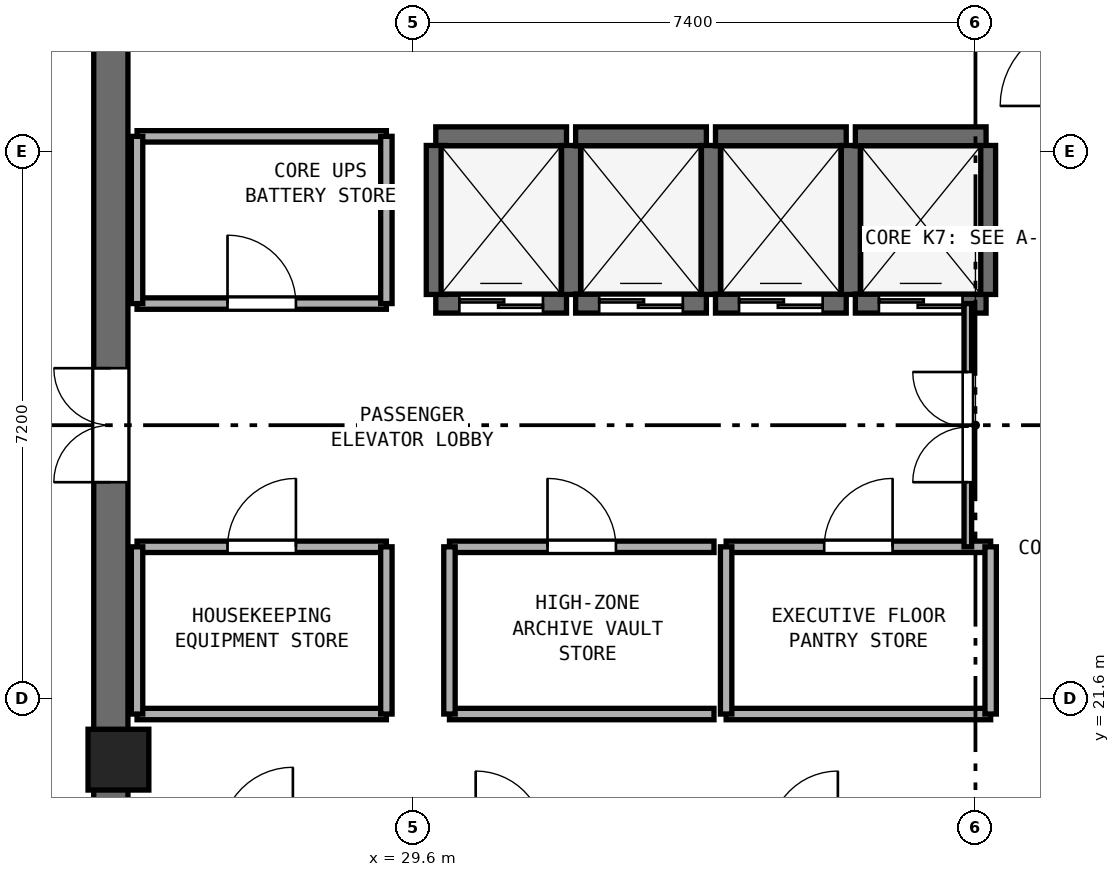
"""IFC4 building model, lengths in metres.
Left out: names, types, materials, properties, quantities, classifications, styles, units other than length and angle.
Written with IfcOpenShell. Run it as: python <this file> out.ifc"""

import sys

from ifc_helpers import new_model, si_unit, direction, frame, frame_2d, origin, origin_2d, place, context, subcontext, project, spatial, rectangle, extrude, element, fill, save


model = new_model("IFC4")
c1 = context("Model", 3, precision=1e-05, world=origin(), true_north=direction((0.0, 1.0)))
c2 = subcontext(c1, "Body", "Model", "MODEL_VIEW")
j1 = project(units=[si_unit("LENGTHUNIT", "METRE"), si_unit("PLANEANGLEUNIT", "RADIAN")], contexts=[c1])
p1 = place(None, origin())
s1 = spatial("IfcSite", under=j1, at=p1, CompositionType="ELEMENT")
p2 = place(p1, origin())
s2 = spatial("IfcBuilding", under=s1, at=p2, CompositionType="ELEMENT")
p3 = place(p2, frame((0.0, 0.0, 289.6)))
s3 = spatial("IfcBuildingStorey", under=s2, at=p3, CompositionType="ELEMENT", Elevation=289.6)
p4 = place(p3, frame((25.625, 17.45, 0.0), z_axis=(0.0, 0.0, 1.0), x_axis=(0.0, 1.0, 0.0)))
e1 = element("IfcWall", 1, at=p4, inside=s3, PredefinedType="SHEAR", context=c2, shape_type="SweptSolid", body=[
    extrude(rectangle(XDim=15.5, YDim=0.45, at=frame_2d((7.75, 0.0))), origin(), (0.0, 0.0, 1.0), 3.54),
])
p5 = place(p4, frame((7.0, 0.0, 0.0)))
e2 = element("IfcOpeningElement", 2, at=p5, cuts=e1, PredefinedType="OPENING", context=c2, shape_type="SweptSolid", body=[
    extrude(rectangle(XDim=1.5, YDim=2.15, at=frame_2d((0.75, 1.075))), frame((0.0, 0.235, 0.0), z_axis=(0.0, -1.0, 0.0), x_axis=(1.0, 0.0, 0.0)), (0.0, 0.0, 1.0), 0.47),
])
p6 = place(p3, frame((25.725, 20.8, 0.0), z_axis=(0.0, 0.0, 1.0), x_axis=(1.0, 0.0, 0.0)))
e3 = element("IfcColumn", 3, at=p6, inside=s3, PredefinedType="PILASTER", context=c2, shape_type="SweptSolid", body=[
    extrude(rectangle(XDim=0.8, YDim=0.8, at=origin_2d()), origin(), (0.0, 0.0, 1.0), 3.8),
])
p7 = place(p3, frame((29.9, 26.8, 0.0), z_axis=(0.0, 0.0, 1.0), x_axis=(1.0, 0.0, 0.0)))
e4 = element("IfcWall", 4, at=p7, inside=s3, PredefinedType="SHEAR", context=c2, shape_type="SweptSolid", body=[
    extrude(rectangle(XDim=1.72, YDim=0.25, at=frame_2d((0.86, 0.0))), origin(), (0.0, 0.0, 1.0), 3.54),
])
p8 = place(p7, frame((0.31, 0.0, 0.0)))
e5 = element("IfcOpeningElement", 5, at=p8, cuts=e4, PredefinedType="OPENING", context=c2, shape_type="SweptSolid", body=[
    extrude(rectangle(XDim=1.1, YDim=2.15, at=frame_2d((0.55, 1.075))), frame((0.0, 0.135, 0.0), z_axis=(0.0, -1.0, 0.0), x_axis=(1.0, 0.0, 0.0)), (0.0, 0.0, 1.0), 0.27),
])
p9 = place(p3, frame((29.9, 29.0, 0.0), z_axis=(0.0, 0.0, 1.0), x_axis=(1.0, 0.0, 0.0)))
e6 = element("IfcWall", 6, at=p9, inside=s3, PredefinedType="SHEAR", context=c2, shape_type="SweptSolid", body=[
    extrude(rectangle(XDim=1.72, YDim=0.25, at=frame_2d((0.86, 0.0))), origin(), (0.0, 0.0, 1.0), 3.54),
])
for number, where, z_axis, x_axis in (
    (7, (29.9, 26.92, 0.0), (0.0, 0.0, 1.0), (0.0, 1.0, 0.0)),
    (8, (31.68, 26.92, 0.0), (0.0, 0.0, 1.0), (0.0, 1.0, 0.0)),
):
    element("IfcWall", number, at=place(p3, frame(where, z_axis=z_axis, x_axis=x_axis)), inside=s3, PredefinedType="SHEAR", context=c2, shape_type="SweptSolid", body=[
        extrude(rectangle(XDim=1.96, YDim=0.25, at=frame_2d((0.98, 0.0))), origin(), (0.0, 0.0, 1.0), 3.54),
    ])
p10 = place(p3, frame((31.74, 26.8, 0.0), z_axis=(0.0, 0.0, 1.0), x_axis=(1.0, 0.0, 0.0)))
e9 = element("IfcWall", 9, at=p10, inside=s3, PredefinedType="SHEAR", context=c2, shape_type="SweptSolid", body=[
    extrude(rectangle(XDim=1.72, YDim=0.25, at=frame_2d((0.86, 0.0))), origin(), (0.0, 0.0, 1.0), 3.54),
])
p11 = place(p10, frame((0.31, 0.0, 0.0)))
e10 = element("IfcOpeningElement", 10, at=p11, cuts=e9, PredefinedType="OPENING", context=c2, shape_type="SweptSolid", body=[
    extrude(rectangle(XDim=1.1, YDim=2.15, at=frame_2d((0.55, 1.075))), frame((0.0, 0.135, 0.0), z_axis=(0.0, -1.0, 0.0), x_axis=(1.0, 0.0, 0.0)), (0.0, 0.0, 1.0), 0.27),
])
p12 = place(p3, frame((31.74, 29.0, 0.0), z_axis=(0.0, 0.0, 1.0), x_axis=(1.0, 0.0, 0.0)))
e11 = element("IfcWall", 11, at=p12, inside=s3, PredefinedType="SHEAR", context=c2, shape_type="SweptSolid", body=[
    extrude(rectangle(XDim=1.72, YDim=0.25, at=frame_2d((0.86, 0.0))), origin(), (0.0, 0.0, 1.0), 3.54),
])
p13 = place(p3, frame((33.52, 26.92, 0.0), z_axis=(0.0, 0.0, 1.0), x_axis=(0.0, 1.0, 0.0)))
e12 = element("IfcWall", 12, at=p13, inside=s3, PredefinedType="SHEAR", context=c2, shape_type="SweptSolid", body=[
    extrude(rectangle(XDim=1.96, YDim=0.25, at=frame_2d((0.98, 0.0))), origin(), (0.0, 0.0, 1.0), 3.54),
])
p14 = place(p3, frame((33.58, 26.8, 0.0), z_axis=(0.0, 0.0, 1.0), x_axis=(1.0, 0.0, 0.0)))
e13 = element("IfcWall", 13, at=p14, inside=s3, PredefinedType="SHEAR", context=c2, shape_type="SweptSolid", body=[
    extrude(rectangle(XDim=1.72, YDim=0.25, at=frame_2d((0.86, 0.0))), origin(), (0.0, 0.0, 1.0), 3.54),
])
p15 = place(p14, frame((0.31, 0.0, 0.0)))
e14 = element("IfcOpeningElement", 14, at=p15, cuts=e13, PredefinedType="OPENING", context=c2, shape_type="SweptSolid", body=[
    extrude(rectangle(XDim=1.1, YDim=2.15, at=frame_2d((0.55, 1.075))), frame((0.0, 0.135, 0.0), z_axis=(0.0, -1.0, 0.0), x_axis=(1.0, 0.0, 0.0)), (0.0, 0.0, 1.0), 0.27),
])
p16 = place(p3, frame((33.58, 29.0, 0.0), z_axis=(0.0, 0.0, 1.0), x_axis=(1.0, 0.0, 0.0)))
e15 = element("IfcWall", 15, at=p16, inside=s3, PredefinedType="SHEAR", context=c2, shape_type="SweptSolid", body=[
    extrude(rectangle(XDim=1.72, YDim=0.25, at=frame_2d((0.86, 0.0))), origin(), (0.0, 0.0, 1.0), 3.54),
])
p17 = place(p3, frame((35.36, 26.92, 0.0), z_axis=(0.0, 0.0, 1.0), x_axis=(0.0, 1.0, 0.0)))
e16 = element("IfcWall", 16, at=p17, inside=s3, PredefinedType="SHEAR", context=c2, shape_type="SweptSolid", body=[
    extrude(rectangle(XDim=1.96, YDim=0.25, at=frame_2d((0.98, 0.0))), origin(), (0.0, 0.0, 1.0), 3.54),
])
p18 = place(p3, frame((35.42, 26.8, 0.0), z_axis=(0.0, 0.0, 1.0), x_axis=(1.0, 0.0, 0.0)))
e17 = element("IfcWall", 17, at=p18, inside=s3, PredefinedType="SHEAR", context=c2, shape_type="SweptSolid", body=[
    extrude(rectangle(XDim=1.72, YDim=0.25, at=frame_2d((0.86, 0.0))), origin(), (0.0, 0.0, 1.0), 3.54),
])
p19 = place(p18, frame((0.31, 0.0, 0.0)))
e18 = element("IfcOpeningElement", 18, at=p19, cuts=e17, PredefinedType="OPENING", context=c2, shape_type="SweptSolid", body=[
    extrude(rectangle(XDim=1.1, YDim=2.15, at=frame_2d((0.55, 1.075))), frame((0.0, 0.135, 0.0), z_axis=(0.0, -1.0, 0.0), x_axis=(1.0, 0.0, 0.0)), (0.0, 0.0, 1.0), 0.27),
])
p20 = place(p3, frame((35.42, 29.0, 0.0), z_axis=(0.0, 0.0, 1.0), x_axis=(1.0, 0.0, 0.0)))
e19 = element("IfcWall", 19, at=p20, inside=s3, PredefinedType="SHEAR", context=c2, shape_type="SweptSolid", body=[
    extrude(rectangle(XDim=1.72, YDim=0.25, at=frame_2d((0.86, 0.0))), origin(), (0.0, 0.0, 1.0), 3.54),
])
p21 = place(p3, frame((37.14, 26.92, 0.0), z_axis=(0.0, 0.0, 1.0), x_axis=(0.0, 1.0, 0.0)))
e20 = element("IfcWall", 20, at=p21, inside=s3, PredefinedType="SHEAR", context=c2, shape_type="SweptSolid", body=[
    extrude(rectangle(XDim=1.96, YDim=0.25, at=frame_2d((0.98, 0.0))), origin(), (0.0, 0.0, 1.0), 3.54),
])
p22 = place(p3, frame((25.97, 26.8, 0.0), z_axis=(0.0, 0.0, 1.0), x_axis=(1.0, 0.0, 0.0)))
e21 = element("IfcWall", 21, at=p22, inside=s3, PredefinedType="PARTITIONING", context=c2, shape_type="SweptSolid", body=[
    extrude(rectangle(XDim=3.28, YDim=0.15, at=frame_2d((1.64, 0.0))), origin(), (0.0, 0.0, 1.0), 3.54),
])
p23 = place(p22, frame((1.19, 0.0, 0.0)))
e22 = element("IfcOpeningElement", 22, at=p23, cuts=e21, PredefinedType="OPENING", context=c2, shape_type="SweptSolid", body=[
    extrude(rectangle(XDim=0.9, YDim=2.1, at=frame_2d((0.45, 1.05))), frame((0.0, 0.085, 0.0), z_axis=(0.0, -1.0, 0.0), x_axis=(1.0, 0.0, 0.0)), (0.0, 0.0, 1.0), 0.17),
])
p24 = place(p3, frame((25.97, 29.0, 0.0), z_axis=(0.0, 0.0, 1.0), x_axis=(1.0, 0.0, 0.0)))
e23 = element("IfcWall", 23, at=p24, inside=s3, PredefinedType="PARTITIONING", context=c2, shape_type="SweptSolid", body=[
    extrude(rectangle(XDim=3.28, YDim=0.15, at=frame_2d((1.64, 0.0))), origin(), (0.0, 0.0, 1.0), 3.54),
])
p25 = place(p3, frame((25.97, 26.8, 0.0), z_axis=(0.0, 0.0, 1.0), x_axis=(0.0, 1.0, 0.0)))
e24 = element("IfcWall", 24, at=p25, inside=s3, PredefinedType="PARTITIONING", context=c2, shape_type="SweptSolid", body=[
    extrude(rectangle(XDim=2.2, YDim=0.15, at=frame_2d((1.1, 0.0))), origin(), (0.0, 0.0, 1.0), 2.64),
])
p26 = place(p3, frame((29.25, 26.8, 0.0), z_axis=(0.0, 0.0, 1.0), x_axis=(0.0, 1.0, 0.0)))
e25 = element("IfcWall", 25, at=p26, inside=s3, PredefinedType="PARTITIONING", context=c2, shape_type="SweptSolid", body=[
    extrude(rectangle(XDim=2.2, YDim=0.15, at=frame_2d((1.1, 0.0))), origin(), (0.0, 0.0, 1.0), 3.54),
])
p27 = place(p3, frame((25.97, 21.4, 0.0), z_axis=(0.0, 0.0, 1.0), x_axis=(1.0, 0.0, 0.0)))
e26 = element("IfcWall", 26, at=p27, inside=s3, PredefinedType="PARTITIONING", context=c2, shape_type="SweptSolid", body=[
    extrude(rectangle(XDim=3.28, YDim=0.15, at=frame_2d((1.64, 0.0))), origin(), (0.0, 0.0, 1.0), 3.54),
])
p28 = place(p3, frame((25.97, 23.6, 0.0), z_axis=(0.0, 0.0, 1.0), x_axis=(1.0, 0.0, 0.0)))
e27 = element("IfcWall", 27, at=p28, inside=s3, PredefinedType="PARTITIONING", context=c2, shape_type="SweptSolid", body=[
    extrude(rectangle(XDim=3.28, YDim=0.15, at=frame_2d((1.64, 0.0))), origin(), (0.0, 0.0, 1.0), 3.54),
])
p29 = place(p28, frame((1.19, 0.0, 0.0)))
e28 = element("IfcOpeningElement", 28, at=p29, cuts=e27, PredefinedType="OPENING", context=c2, shape_type="SweptSolid", body=[
    extrude(rectangle(XDim=0.9, YDim=2.1, at=frame_2d((0.45, 1.05))), frame((0.0, 0.085, 0.0), z_axis=(0.0, -1.0, 0.0), x_axis=(1.0, 0.0, 0.0)), (0.0, 0.0, 1.0), 0.17),
])
p30 = place(p3, frame((25.97, 21.4, 0.0), z_axis=(0.0, 0.0, 1.0), x_axis=(0.0, 1.0, 0.0)))
e29 = element("IfcWall", 29, at=p30, inside=s3, PredefinedType="PARTITIONING", context=c2, shape_type="SweptSolid", body=[
    extrude(rectangle(XDim=2.2, YDim=0.15, at=frame_2d((1.1, 0.0))), origin(), (0.0, 0.0, 1.0), 2.64),
])
p31 = place(p3, frame((29.25, 21.4, 0.0), z_axis=(0.0, 0.0, 1.0), x_axis=(0.0, 1.0, 0.0)))
e30 = element("IfcWall", 30, at=p31, inside=s3, PredefinedType="PARTITIONING", context=c2, shape_type="SweptSolid", body=[
    extrude(rectangle(XDim=2.2, YDim=0.15, at=frame_2d((1.1, 0.0))), origin(), (0.0, 0.0, 1.0), 3.54),
])
p32 = place(p3, frame((30.08, 21.4, 0.0), z_axis=(0.0, 0.0, 1.0), x_axis=(1.0, 0.0, 0.0)))
e31 = element("IfcWall", 31, at=p32, inside=s3, PredefinedType="PARTITIONING", context=c2, shape_type="SweptSolid", body=[
    extrude(rectangle(XDim=3.48, YDim=0.15, at=frame_2d((1.74, 0.0))), origin(), (0.0, 0.0, 1.0), 3.54),
])
p33 = place(p3, frame((30.08, 23.6, 0.0), z_axis=(0.0, 0.0, 1.0), x_axis=(1.0, 0.0, 0.0)))
e32 = element("IfcWall", 32, at=p33, inside=s3, PredefinedType="PARTITIONING", context=c2, shape_type="SweptSolid", body=[
    extrude(rectangle(XDim=3.48, YDim=0.15, at=frame_2d((1.74, 0.0))), origin(), (0.0, 0.0, 1.0), 3.54),
])
p34 = place(p33, frame((1.29, 0.0, 0.0)))
e33 = element("IfcOpeningElement", 33, at=p34, cuts=e32, PredefinedType="OPENING", context=c2, shape_type="SweptSolid", body=[
    extrude(rectangle(XDim=0.9, YDim=2.1, at=frame_2d((0.45, 1.05))), frame((0.0, 0.085, 0.0), z_axis=(0.0, -1.0, 0.0), x_axis=(1.0, 0.0, 0.0)), (0.0, 0.0, 1.0), 0.17),
])
p35 = place(p3, frame((30.08, 21.4, 0.0), z_axis=(0.0, 0.0, 1.0), x_axis=(0.0, 1.0, 0.0)))
e34 = element("IfcWall", 34, at=p35, inside=s3, PredefinedType="PARTITIONING", context=c2, shape_type="SweptSolid", body=[
    extrude(rectangle(XDim=2.2, YDim=0.15, at=frame_2d((1.1, 0.0))), origin(), (0.0, 0.0, 1.0), 3.54),
])
p36 = place(p3, frame((33.72, 21.4, 0.0), z_axis=(0.0, 0.0, 1.0), x_axis=(1.0, 0.0, 0.0)))
e35 = element("IfcWall", 35, at=p36, inside=s3, PredefinedType="PARTITIONING", context=c2, shape_type="SweptSolid", body=[
    extrude(rectangle(XDim=3.48, YDim=0.15, at=frame_2d((1.74, 0.0))), origin(), (0.0, 0.0, 1.0), 3.54),
])
p37 = place(p3, frame((33.72, 23.6, 0.0), z_axis=(0.0, 0.0, 1.0), x_axis=(1.0, 0.0, 0.0)))
e36 = element("IfcWall", 36, at=p37, inside=s3, PredefinedType="PARTITIONING", context=c2, shape_type="SweptSolid", body=[
    extrude(rectangle(XDim=3.48, YDim=0.15, at=frame_2d((1.74, 0.0))), origin(), (0.0, 0.0, 1.0), 3.54),
])
p38 = place(p37, frame((1.29, 0.0, 0.0)))
e37 = element("IfcOpeningElement", 37, at=p38, cuts=e36, PredefinedType="OPENING", context=c2, shape_type="SweptSolid", body=[
    extrude(rectangle(XDim=0.9, YDim=2.1, at=frame_2d((0.45, 1.05))), frame((0.0, 0.085, 0.0), z_axis=(0.0, -1.0, 0.0), x_axis=(1.0, 0.0, 0.0)), (0.0, 0.0, 1.0), 0.17),
])
for number, where, z_axis, x_axis in (
    (38, (33.72, 21.4, 0.0), (0.0, 0.0, 1.0), (0.0, 1.0, 0.0)),
    (39, (37.2, 21.4, 0.0), (0.0, 0.0, 1.0), (0.0, 1.0, 0.0)),
):
    element("IfcWall", number, at=place(p3, frame(where, z_axis=z_axis, x_axis=x_axis)), inside=s3, PredefinedType="PARTITIONING", context=c2, shape_type="SweptSolid", body=[
        extrude(rectangle(XDim=2.2, YDim=0.15, at=frame_2d((1.1, 0.0))), origin(), (0.0, 0.0, 1.0), 3.54),
    ])
p39 = place(p3, frame((36.9, 23.6, 0.0), z_axis=(0.0, 0.0, 1.0), x_axis=(0.0, 1.0, 0.0)))
e40 = element("IfcWall", 40, at=p39, inside=s3, PredefinedType="PARTITIONING", context=c2, shape_type="SweptSolid", body=[
    extrude(rectangle(XDim=3.2, YDim=0.1, at=frame_2d((1.6, 0.0))), origin(), (0.0, 0.0, 1.0), 3.54),
])
p40 = place(p39, frame((0.85, 0.0, 0.0)))
e41 = element("IfcOpeningElement", 41, at=p40, cuts=e40, PredefinedType="OPENING", context=c2, shape_type="SweptSolid", body=[
    extrude(rectangle(XDim=1.45, YDim=2.12, at=frame_2d((0.725, 1.06))), frame((0.0, 0.06, 0.0), z_axis=(0.0, -1.0, 0.0), x_axis=(1.0, 0.0, 0.0)), (0.0, 0.0, 1.0), 0.12),
])
p41 = place(p8, origin())
e42 = element("IfcDoor", 42, at=p41, inside=s3, OperationType="DOUBLE_DOOR_SLIDING", PredefinedType="DOOR", context=c2, shape_type="SweptSolid", body=[
    extrude(rectangle(XDim=1.1, YDim=2.15, at=frame_2d((0.55, 1.075))), frame((0.0, 0.025, 0.0), z_axis=(0.0, -1.0, 0.0), x_axis=(1.0, 0.0, 0.0)), (0.0, 0.0, 1.0), 0.05),
])
fill(e5, e42)
p42 = place(p11, origin())
e43 = element("IfcDoor", 43, at=p42, inside=s3, OperationType="DOUBLE_DOOR_SLIDING", PredefinedType="DOOR", context=c2, shape_type="SweptSolid", body=[
    extrude(rectangle(XDim=1.1, YDim=2.15, at=frame_2d((0.55, 1.075))), frame((0.0, 0.025, 0.0), z_axis=(0.0, -1.0, 0.0), x_axis=(1.0, 0.0, 0.0)), (0.0, 0.0, 1.0), 0.05),
])
fill(e10, e43)
p43 = place(p15, origin())
e44 = element("IfcDoor", 44, at=p43, inside=s3, OperationType="DOUBLE_DOOR_SLIDING", PredefinedType="DOOR", context=c2, shape_type="SweptSolid", body=[
    extrude(rectangle(XDim=1.1, YDim=2.15, at=frame_2d((0.55, 1.075))), frame((0.0, 0.025, 0.0), z_axis=(0.0, -1.0, 0.0), x_axis=(1.0, 0.0, 0.0)), (0.0, 0.0, 1.0), 0.05),
])
fill(e14, e44)
p44 = place(p19, origin())
e45 = element("IfcDoor", 45, at=p44, inside=s3, OperationType="DOUBLE_DOOR_SLIDING", PredefinedType="DOOR", context=c2, shape_type="SweptSolid", body=[
    extrude(rectangle(XDim=1.1, YDim=2.15, at=frame_2d((0.55, 1.075))), frame((0.0, 0.025, 0.0), z_axis=(0.0, -1.0, 0.0), x_axis=(1.0, 0.0, 0.0)), (0.0, 0.0, 1.0), 0.05),
])
fill(e18, e45)
p45 = place(p5, origin())
e46 = element("IfcDoor", 46, at=p45, inside=s3, OperationType="DOUBLE_DOOR_SINGLE_SWING", PredefinedType="DOOR", context=c2, shape_type="SweptSolid", body=[
    extrude(rectangle(XDim=1.5, YDim=2.15, at=frame_2d((0.75, 1.075))), frame((0.0, 0.025, 0.0), z_axis=(0.0, -1.0, 0.0), x_axis=(1.0, 0.0, 0.0)), (0.0, 0.0, 1.0), 0.05),
])
fill(e2, e46)
p46 = place(p23, origin())
e47 = element("IfcDoor", 47, at=p46, inside=s3, OperationType="SINGLE_SWING_LEFT", PredefinedType="DOOR", context=c2, shape_type="SweptSolid", body=[
    extrude(rectangle(XDim=0.9, YDim=2.1, at=frame_2d((0.45, 1.05))), frame((0.0, 0.025, 0.0), z_axis=(0.0, -1.0, 0.0), x_axis=(1.0, 0.0, 0.0)), (0.0, 0.0, 1.0), 0.05),
])
fill(e22, e47)
p47 = place(p29, origin())
e48 = element("IfcDoor", 48, at=p47, inside=s3, OperationType="SINGLE_SWING_RIGHT", PredefinedType="DOOR", context=c2, shape_type="SweptSolid", body=[
    extrude(rectangle(XDim=0.9, YDim=2.1, at=frame_2d((0.45, 1.05))), frame((0.0, 0.025, 0.0), z_axis=(0.0, -1.0, 0.0), x_axis=(1.0, 0.0, 0.0)), (0.0, 0.0, 1.0), 0.05),
])
fill(e28, e48)
p48 = place(p34, origin())
e49 = element("IfcDoor", 49, at=p48, inside=s3, OperationType="SINGLE_SWING_LEFT", PredefinedType="DOOR", context=c2, shape_type="SweptSolid", body=[
    extrude(rectangle(XDim=0.9, YDim=2.1, at=frame_2d((0.45, 1.05))), frame((0.0, 0.025, 0.0), z_axis=(0.0, -1.0, 0.0), x_axis=(1.0, 0.0, 0.0)), (0.0, 0.0, 1.0), 0.05),
])
fill(e33, e49)
p49 = place(p38, origin())
e50 = element("IfcDoor", 50, at=p49, inside=s3, OperationType="SINGLE_SWING_RIGHT", PredefinedType="DOOR", context=c2, shape_type="SweptSolid", body=[
    extrude(rectangle(XDim=0.9, YDim=2.1, at=frame_2d((0.45, 1.05))), frame((0.0, 0.025, 0.0), z_axis=(0.0, -1.0, 0.0), x_axis=(1.0, 0.0, 0.0)), (0.0, 0.0, 1.0), 0.05),
])
fill(e37, e50)
p50 = place(p40, origin())
e51 = element("IfcDoor", 51, at=p50, inside=s3, OperationType="DOUBLE_DOOR_SINGLE_SWING", PredefinedType="DOOR", context=c2, shape_type="SweptSolid", body=[
    extrude(rectangle(XDim=1.45, YDim=2.12, at=frame_2d((0.725, 1.06))), frame((0.0, 0.025, 0.0), z_axis=(0.0, -1.0, 0.0), x_axis=(1.0, 0.0, 0.0)), (0.0, 0.0, 1.0), 0.05),
])
fill(e41, e51)
save(model, sys.argv[1])
